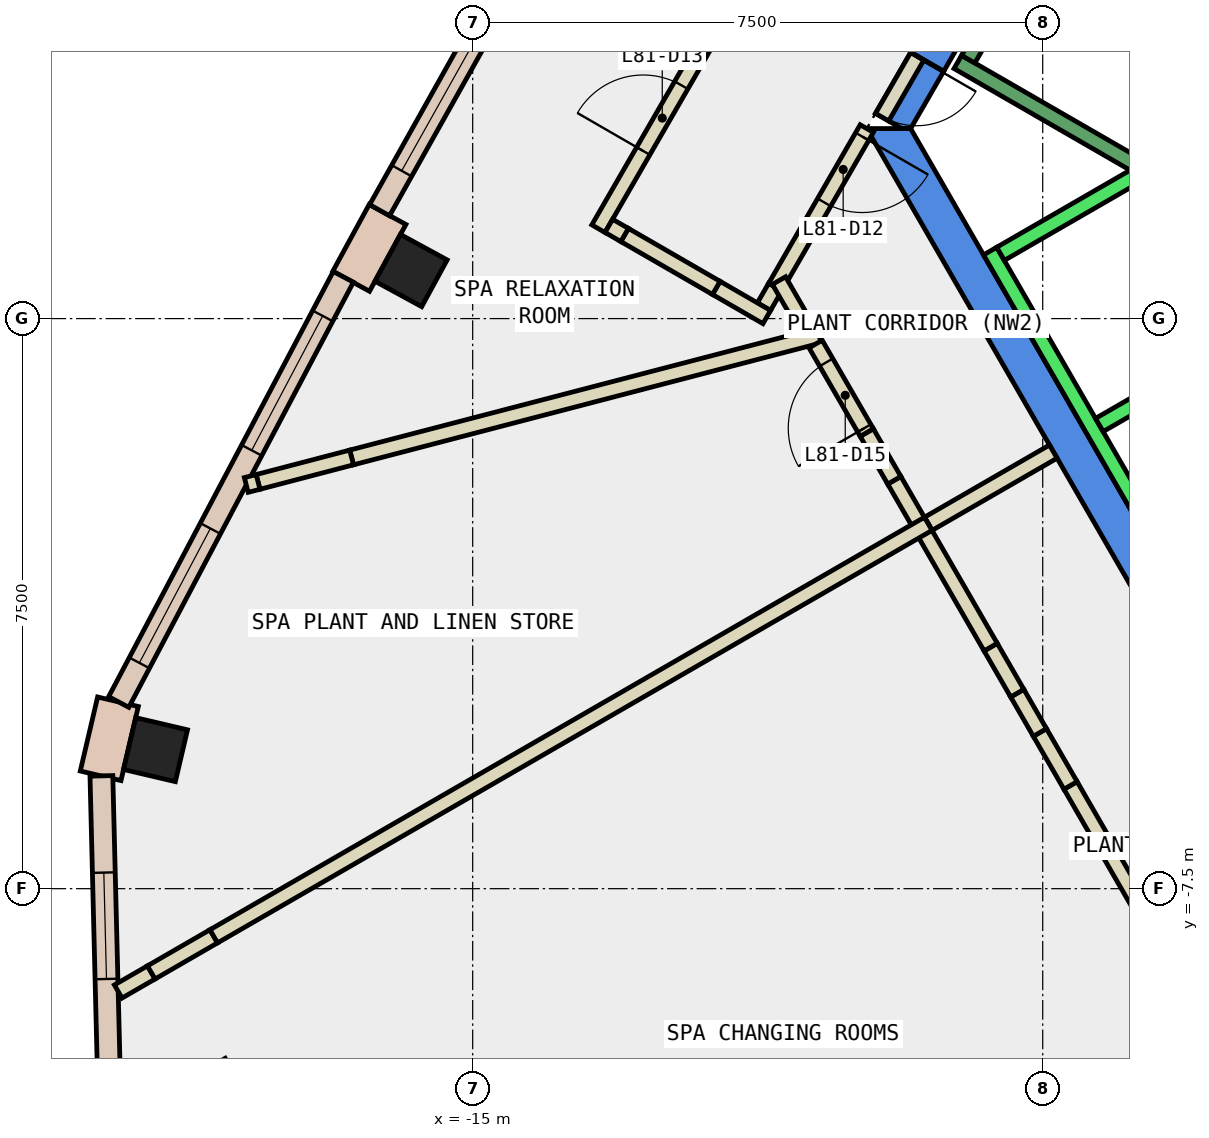
"""IFC4 building model, lengths in metres.
Left out: names, types, materials, properties, quantities, classifications, styles, units other than length and angle.
Written with IfcOpenShell. Run it as: python <this file> out.ifc"""

import sys

from ifc_helpers import new_model, si_unit, direction, frame, frame_2d, origin, origin_2d, place, context, subcontext, project, spatial, polyline, rectangle, outline, extrude, element, fill, save


model = new_model("IFC4")
c1 = context("Model", 3, precision=1e-05, world=origin(), true_north=direction((0.0, 1.0)))
c2 = subcontext(c1, "Body", "Model", "MODEL_VIEW")
j1 = project(units=[si_unit("LENGTHUNIT", "METRE"), si_unit("PLANEANGLEUNIT", "RADIAN")], contexts=[c1])
p1 = place(None, origin())
s1 = spatial("IfcSite", under=j1, at=p1, CompositionType="ELEMENT")
p2 = place(p1, origin())
s2 = spatial("IfcBuilding", under=s1, at=p2, CompositionType="ELEMENT")
p3 = place(p2, frame((0.0, 0.0, 344.9)))
s3 = spatial("IfcBuildingStorey", under=s2, at=p3, CompositionType="ELEMENT", Elevation=344.9)
for number, where, z_axis, x_axis in (
    (1, (-15.811, 0.632, -0.35), (0.0, 0.0, 1.0), (0.478, 0.878, 0.0)),
    (2, (-19.173, -5.671, -0.35), (0.0, 0.0, 1.0), (0.228, 0.974, 0.0)),
):
    element("IfcColumn", number, at=place(p3, frame(where, z_axis=z_axis, x_axis=x_axis)), inside=s3, PredefinedType="COLUMN", context=c2, shape_type="SweptSolid", body=[
        extrude(rectangle(XDim=0.7, YDim=0.7, at=origin_2d()), origin(), (0.0, 0.0, 1.0), 4.4),
    ])
p4 = place(p3, frame((-18.512, -10.688, -0.35), z_axis=(0.0, 0.0, 1.0), x_axis=(0.866025403784, 0.5, 0.0)))
e3 = element("IfcColumn", 3, at=p4, inside=s3, PredefinedType="COLUMN", context=c2, shape_type="SweptSolid", body=[
    extrude(rectangle(XDim=1.4, YDim=1.4, at=origin_2d()), origin(), (0.0, 0.0, 1.0), 4.4),
])
p5 = place(p3, frame((0.0, 0.0, -0.35)))
e4 = element("IfcWall", 4, at=p5, inside=s3, PredefinedType="SHEAR", context=c2, shape_type="SweptSolid", body=[
    extrude(outline(polyline([(-9.236, 3.502), (-8.803, 3.253), (-4.619, 10.5), (-4.907, 11.0), (-9.236, 3.502)])), origin(), (0.0, 0.0, 1.0), 4.4),
])
p6 = place(p3, frame((0.0, 0.0, 3.6)))
e5 = element("IfcWall", 5, at=p6, inside=s3, PredefinedType="SHEAR", context=c2, shape_type="SweptSolid", body=[
    extrude(outline(polyline([(-9.7, 2.7), (-9.354, 2.5), (-9.238, 2.5), (-8.803, 3.253), (-9.236, 3.502), (-9.7, 2.7)])), origin(), (0.0, 0.0, 1.0), 0.45),
])
p7 = place(p3, frame((0.0, 0.0, -0.35)))
e6 = element("IfcWall", 6, at=p7, inside=s3, PredefinedType="SHEAR", context=c2, shape_type="SweptSolid", body=[
    extrude(outline(polyline([(-9.815, 2.5), (-4.907, -6.0), (-4.619, -5.5), (-9.238, 2.5), (-9.815, 2.5)])), origin(), (0.0, 0.0, 1.0), 4.4),
])
p8 = place(p3, frame((-16.12, 1.37, 0.0), z_axis=(0.0, 0.0, 1.0), x_axis=(-0.478442030542, -0.878119139645, 0.0)))
e7 = element("IfcWall", 7, at=p8, inside=s3, PredefinedType="STANDARD", context=c2, shape_type="SweptSolid", body=[
    extrude(rectangle(XDim=1.001, YDim=0.55, at=frame_2d((0.5, 0.0))), origin(), (0.0, 0.0, 1.0), 4.05),
])
p9 = place(p3, frame((-19.667, -5.041, 0.0), z_axis=(0.0, 0.0, 1.0), x_axis=(-0.227978015861, -0.97366627973, 0.0)))
e8 = element("IfcWall", 8, at=p9, inside=s3, PredefinedType="STANDARD", context=c2, shape_type="SweptSolid", body=[
    extrude(rectangle(XDim=1.0, YDim=0.55, at=frame_2d((0.5, 0.0))), origin(), (0.0, 0.0, 1.0), 4.05),
])
p10 = place(p3, frame((-13.104, 6.99, 0.0), z_axis=(0.0, 0.0, 1.0), x_axis=(-0.489232514948, -0.872153396094, 0.0)))
e9 = element("IfcWall", 9, at=p10, inside=s3, PredefinedType="STANDARD", context=c2, shape_type="SweptSolid", body=[
    extrude(rectangle(XDim=6.38, YDim=0.3, at=frame_2d((3.19, 0.0))), origin(), (0.0, 0.0, 1.0), 4.05),
])
p11 = place(p10, frame((0.595, 0.0, 0.9)))
e10 = element("IfcOpeningElement", 10, at=p11, cuts=e9, PredefinedType="OPENING", context=c2, shape_type="SweptSolid", body=[
    extrude(rectangle(XDim=2.0, YDim=3.0, at=frame_2d((1.0, 1.5))), frame((0.0, 0.16, 0.0), z_axis=(0.0, -1.0, 0.0), x_axis=(1.0, 0.0, 0.0)), (0.0, 0.0, 1.0), 0.32),
])
p12 = place(p10, frame((3.785, 0.0, 0.9)))
e11 = element("IfcOpeningElement", 11, at=p12, cuts=e9, PredefinedType="OPENING", context=c2, shape_type="SweptSolid", body=[
    extrude(rectangle(XDim=2.0, YDim=3.0, at=frame_2d((1.0, 1.5))), frame((0.0, 0.16, 0.0), z_axis=(0.0, -1.0, 0.0), x_axis=(1.0, 0.0, 0.0)), (0.0, 0.0, 1.0), 0.32),
])
p13 = place(p3, frame((-16.702, 0.549, 0.0), z_axis=(0.0, 0.0, 1.0), x_axis=(-0.467155191513, -0.884175337274, 0.0)))
e12 = element("IfcWall", 12, at=p13, inside=s3, PredefinedType="STANDARD", context=c2, shape_type="SweptSolid", body=[
    extrude(rectangle(XDim=6.326, YDim=0.3, at=frame_2d((3.163, 0.0))), origin(), (0.0, 0.0, 1.0), 4.05),
])
p14 = place(p13, frame((0.581, 0.0, 0.9)))
e13 = element("IfcOpeningElement", 13, at=p14, cuts=e12, PredefinedType="OPENING", context=c2, shape_type="SweptSolid", body=[
    extrude(rectangle(XDim=2.0, YDim=3.0, at=frame_2d((1.0, 1.5))), frame((0.0, 0.16, 0.0), z_axis=(0.0, -1.0, 0.0), x_axis=(1.0, 0.0, 0.0)), (0.0, 0.0, 1.0), 0.32),
])
p15 = place(p13, frame((3.744, 0.0, 0.9)))
e14 = element("IfcOpeningElement", 14, at=p15, cuts=e12, PredefinedType="OPENING", context=c2, shape_type="SweptSolid", body=[
    extrude(rectangle(XDim=2.0, YDim=3.0, at=frame_2d((1.0, 1.5))), frame((0.0, 0.16, 0.0), z_axis=(0.0, -1.0, 0.0), x_axis=(1.0, 0.0, 0.0)), (0.0, 0.0, 1.0), 0.32),
])
p16 = place(p3, frame((-19.885, -6.016, 0.0), z_axis=(0.0, 0.0, 1.0), x_axis=(0.025006167975, -0.99968729689, 0.0)))
e15 = element("IfcWall", 15, at=p16, inside=s3, PredefinedType="STANDARD", context=c2, shape_type="SweptSolid", body=[
    extrude(rectangle(XDim=4.364, YDim=0.3, at=frame_2d((2.182, 0.0))), origin(), (0.0, 0.0, 1.0), 4.05),
])
p17 = place(p16, frame((1.273, 0.0, 0.9)))
e16 = element("IfcOpeningElement", 16, at=p17, cuts=e15, PredefinedType="OPENING", context=c2, shape_type="SweptSolid", body=[
    extrude(rectangle(XDim=1.4, YDim=3.0, at=frame_2d((0.7, 1.5))), frame((0.0, 0.16, 0.0), z_axis=(0.0, -1.0, 0.0), x_axis=(1.0, 0.0, 0.0)), (0.0, 0.0, 1.0), 0.32),
])
p18 = place(p3, frame((-6.112, -7.913, 0.0), z_axis=(0.0, 0.0, 1.0), x_axis=(-0.499812034598, 0.866133898465, 0.0)))
e17 = element("IfcWall", 17, at=p18, inside=s3, PredefinedType="PARTITIONING", context=c2, shape_type="SweptSolid", body=[
    extrude(rectangle(XDim=2.045, YDim=0.2, at=frame_2d((1.022, 0.0))), origin(), (0.0, 0.0, 1.0), 4.05),
])
p19 = place(p3, frame((-9.006, -2.7, 0.0), z_axis=(0.0, 0.0, 1.0), x_axis=(0.865980106173, 0.500078449558, 0.0)))
e18 = element("IfcWall", 18, at=p19, inside=s3, PredefinedType="PARTITIONING", context=c2, shape_type="SweptSolid", body=[
    extrude(rectangle(XDim=1.9, YDim=0.2, at=frame_2d((0.95, 0.0))), origin(), (0.0, 0.0, 1.0), 4.05),
])
p20 = place(p3, frame((-19.664, -8.853, 0.0), z_axis=(0.0, 0.0, 1.0), x_axis=(0.866201770413, 0.499694399542, 0.0)))
e19 = element("IfcWall", 19, at=p20, inside=s3, PredefinedType="PARTITIONING", context=c2, shape_type="SweptSolid", body=[
    extrude(rectangle(XDim=0.502, YDim=0.2, at=frame_2d((0.251, 0.0))), origin(), (0.0, 0.0, 1.0), 4.05),
])
p21 = place(p3, frame((-9.815, 2.5, 0.0), z_axis=(0.0, 0.0, 1.0), x_axis=(-0.500061536317, -0.86598987286, 0.0)))
e20 = element("IfcWall", 20, at=p21, inside=s3, PredefinedType="PARTITIONING", context=c2, shape_type="SweptSolid", body=[
    extrude(rectangle(XDim=2.41, YDim=0.2, at=frame_2d((1.205, 0.0))), origin(), (0.0, 0.0, 1.0), 4.05),
])
p22 = place(p21, frame((0.121, 0.0, 0.0)))
e21 = element("IfcOpeningElement", 21, at=p22, cuts=e20, PredefinedType="OPENING", context=c2, shape_type="SweptSolid", body=[
    extrude(rectangle(XDim=1.0, YDim=2.1, at=frame_2d((0.5, 1.05))), frame((0.0, 0.11, 0.0), z_axis=(0.0, -1.0, 0.0), x_axis=(1.0, 0.0, 0.0)), (0.0, 0.0, 1.0), 0.22),
])
p23 = place(p3, frame((-11.02, 0.413, 0.0), z_axis=(0.0, 0.0, 1.0), x_axis=(-0.500222587251, -0.865896854829, 0.0)))
e22 = element("IfcWall", 22, at=p23, inside=s3, PredefinedType="PARTITIONING", context=c2, shape_type="SweptSolid", body=[
    extrude(rectangle(XDim=0.296, YDim=0.2, at=frame_2d((0.148, 0.0))), origin(), (0.0, 0.0, 1.0), 4.05),
])
p24 = place(p3, frame((-11.131, 0.02, 0.0), z_axis=(0.0, 0.0, 1.0), x_axis=(-0.865586075524, 0.500760168003, 0.0)))
e23 = element("IfcWall", 23, at=p24, inside=s3, PredefinedType="PARTITIONING", context=c2, shape_type="SweptSolid", body=[
    extrude(rectangle(XDim=0.767, YDim=0.2, at=frame_2d((0.383, 0.0))), origin(), (0.0, 0.0, 1.0), 4.05),
])
p25 = place(p3, frame((-13.346, 1.183, 0.0), z_axis=(0.0, 0.0, 1.0), x_axis=(0.500073414727, 0.865983013623, 0.0)))
e24 = element("IfcWall", 24, at=p25, inside=s3, PredefinedType="PARTITIONING", context=c2, shape_type="SweptSolid", body=[
    extrude(rectangle(XDim=5.359, YDim=0.2, at=frame_2d((2.68, 0.0))), origin(), (0.0, 0.0, 1.0), 4.05),
])
p26 = place(p25, frame((1.18, 0.0, 0.0)))
e25 = element("IfcOpeningElement", 25, at=p26, cuts=e24, PredefinedType="OPENING", context=c2, shape_type="SweptSolid", body=[
    extrude(rectangle(XDim=1.0, YDim=2.1, at=frame_2d((0.5, 1.05))), frame((0.0, 0.11, 0.0), z_axis=(0.0, -1.0, 0.0), x_axis=(1.0, 0.0, 0.0)), (0.0, 0.0, 1.0), 0.22),
])
p27 = place(p3, frame((-10.588, -0.161, 0.0), z_axis=(0.0, 0.0, 1.0), x_axis=(-0.500506694522, 0.865732665861, 0.0)))
e26 = element("IfcWall", 26, at=p27, inside=s3, PredefinedType="PARTITIONING", context=c2, shape_type="SweptSolid", body=[
    extrude(rectangle(XDim=0.763, YDim=0.2, at=frame_2d((0.382, 0.0))), origin(), (0.0, 0.0, 1.0), 4.05),
])
p28 = place(p3, frame((-9.093, -2.75, 0.0), z_axis=(0.0, 0.0, 1.0), x_axis=(-0.500153222552, 0.865936922628, 0.0)))
e27 = element("IfcWall", 27, at=p28, inside=s3, PredefinedType="PARTITIONING", context=c2, shape_type="SweptSolid", body=[
    extrude(rectangle(XDim=0.719, YDim=0.2, at=frame_2d((0.36, 0.0))), origin(), (0.0, 0.0, 1.0), 4.05),
])
p29 = place(p3, frame((-10.441, -0.223, 0.0), z_axis=(0.0, 0.0, 1.0), x_axis=(-0.967651517998, -0.252290585866, 0.0)))
e28 = element("IfcWall", 28, at=p29, inside=s3, PredefinedType="PARTITIONING", context=c2, shape_type="SweptSolid", body=[
    extrude(rectangle(XDim=6.358, YDim=0.2, at=frame_2d((3.179, 0.0))), origin(), (0.0, 0.0, 1.0), 4.05),
])
p30 = place(p3, frame((-9.15, 3.452, 0.0), z_axis=(0.0, 0.0, 1.0), x_axis=(-0.500079945886, -0.865979242085, 0.0)))
e29 = element("IfcWall", 29, at=p30, inside=s3, PredefinedType="PARTITIONING", context=c2, shape_type="SweptSolid", body=[
    extrude(rectangle(XDim=0.926, YDim=0.2, at=frame_2d((0.463, 0.0))), origin(), (0.0, 0.0, 1.0), 2.4),
])
p31 = place(p30, frame((0.017, 0.0, 0.0)))
e30 = element("IfcOpeningElement", 30, at=p31, cuts=e29, PredefinedType="OPENING", context=c2, shape_type="SweptSolid", body=[
    extrude(rectangle(XDim=0.9, YDim=2.1, at=frame_2d((0.45, 1.05))), frame((0.0, 0.11, 0.0), z_axis=(0.0, -1.0, 0.0), x_axis=(1.0, 0.0, 0.0)), (0.0, 0.0, 1.0), 0.22),
])
p32 = place(p3, frame((-7.134, -6.142, 0.0), z_axis=(0.0, 0.0, 1.0), x_axis=(-0.500605921862, 0.865675291894, 0.0)))
e31 = element("IfcWall", 31, at=p32, inside=s3, PredefinedType="PARTITIONING", context=c2, shape_type="SweptSolid", body=[
    extrude(rectangle(XDim=0.805, YDim=0.2, at=frame_2d((0.403, 0.0))), origin(), (0.0, 0.0, 1.0), 1.95),
])
p33 = place(p3, frame((-7.537, -5.445, 0.0), z_axis=(0.0, 0.0, 1.0), x_axis=(-0.499132035552, 0.866525943689, 0.0)))
e32 = element("IfcWall", 32, at=p33, inside=s3, PredefinedType="PARTITIONING", context=c2, shape_type="SweptSolid", body=[
    extrude(rectangle(XDim=0.597, YDim=0.2, at=frame_2d((0.298, 0.0))), origin(), (0.0, 0.0, 1.0), 4.05),
])
p34 = place(p3, frame((-7.835, -4.928, 0.0), z_axis=(0.0, 0.0, 1.0), x_axis=(-0.500265973451, 0.865871789474, 0.0)))
e33 = element("IfcWall", 33, at=p34, inside=s3, PredefinedType="PARTITIONING", context=c2, shape_type="SweptSolid", body=[
    extrude(rectangle(XDim=0.7, YDim=0.2, at=frame_2d((0.35, 0.0))), origin(), (0.0, 0.0, 1.0), 1.95),
])
p35 = place(p3, frame((-8.185, -4.322, 0.0), z_axis=(0.0, 0.0, 1.0), x_axis=(-0.500145398563, 0.865941441609, 0.0)))
e34 = element("IfcWall", 34, at=p35, inside=s3, PredefinedType="PARTITIONING", context=c2, shape_type="SweptSolid", body=[
    extrude(rectangle(XDim=1.815, YDim=0.2, at=frame_2d((0.908, 0.0))), origin(), (0.0, 0.0, 1.0), 4.05),
])
p36 = place(p3, frame((-19.229, -8.602, 0.0), z_axis=(0.0, 0.0, 1.0), x_axis=(0.865795757611, 0.500397548058, 0.0)))
e35 = element("IfcWall", 35, at=p36, inside=s3, PredefinedType="PARTITIONING", context=c2, shape_type="SweptSolid", body=[
    extrude(rectangle(XDim=0.949, YDim=0.2, at=frame_2d((0.475, 0.0))), origin(), (0.0, 0.0, 1.0), 1.95),
])
p37 = place(p3, frame((-18.407, -8.127, 0.0), z_axis=(0.0, 0.0, 1.0), x_axis=(0.866049258168, 0.49995868072, 0.0)))
e36 = element("IfcWall", 36, at=p37, inside=s3, PredefinedType="PARTITIONING", context=c2, shape_type="SweptSolid", body=[
    extrude(rectangle(XDim=10.855, YDim=0.2, at=frame_2d((5.427, 0.0))), origin(), (0.0, 0.0, 1.0), 4.05),
])
p38 = place(p3, frame((-11.795, 0.404, 0.0), z_axis=(0.0, 0.0, 1.0), x_axis=(-0.866109685849, 0.49985399076, 0.0)))
e37 = element("IfcWall", 37, at=p38, inside=s3, PredefinedType="PARTITIONING", context=c2, shape_type="SweptSolid", body=[
    extrude(rectangle(XDim=1.393, YDim=0.2, at=frame_2d((0.696, 0.0))), origin(), (0.0, 0.0, 1.0), 1.95),
])
p39 = place(p3, frame((-13.001, 1.1, 0.0), z_axis=(0.0, 0.0, 1.0), x_axis=(-0.866422508423, 0.499311562953, 0.0)))
e38 = element("IfcWall", 38, at=p39, inside=s3, PredefinedType="PARTITIONING", context=c2, shape_type="SweptSolid", body=[
    extrude(rectangle(XDim=0.24, YDim=0.2, at=frame_2d((0.12, 0.0))), origin(), (0.0, 0.0, 1.0), 4.05),
])
p40 = place(p3, frame((-9.453, -2.127, 0.0), z_axis=(0.0, 0.0, 1.0), x_axis=(-0.499508606083, 0.866308924373, 0.0)))
e39 = element("IfcWall", 39, at=p40, inside=s3, PredefinedType="PARTITIONING", context=c2, shape_type="SweptSolid", body=[
    extrude(rectangle(XDim=0.725, YDim=0.2, at=frame_2d((0.362, 0.0))), origin(), (0.0, 0.0, 1.0), 1.95),
])
p41 = place(p3, frame((-9.815, -1.499, 0.0), z_axis=(0.0, 0.0, 1.0), x_axis=(-0.50057098838, 0.865695492418, 0.0)))
e40 = element("IfcWall", 40, at=p41, inside=s3, PredefinedType="PARTITIONING", context=c2, shape_type="SweptSolid", body=[
    extrude(rectangle(XDim=1.345, YDim=0.2, at=frame_2d((0.672, 0.0))), origin(), (0.0, 0.0, 1.0), 4.05),
])
p42 = place(p41, frame((0.066, 0.0, 0.0)))
e41 = element("IfcOpeningElement", 41, at=p42, cuts=e40, PredefinedType="OPENING", context=c2, shape_type="SweptSolid", body=[
    extrude(rectangle(XDim=1.0, YDim=2.1, at=frame_2d((0.5, 1.05))), frame((0.0, 0.11, 0.0), z_axis=(0.0, -1.0, 0.0), x_axis=(1.0, 0.0, 0.0)), (0.0, 0.0, 1.0), 0.22),
])
p43 = place(p3, frame((-16.593, -1.827, 0.0), z_axis=(0.0, 0.0, 1.0), x_axis=(-0.96744384591, -0.253085766116, 0.0)))
e42 = element("IfcWall", 42, at=p43, inside=s3, PredefinedType="PARTITIONING", context=c2, shape_type="SweptSolid", body=[
    extrude(rectangle(XDim=1.272, YDim=0.2, at=frame_2d((0.636, 0.0))), origin(), (0.0, 0.0, 1.0), 1.95),
])
p44 = place(p3, frame((-17.824, -2.149, 0.0), z_axis=(0.0, 0.0, 1.0), x_axis=(-0.968229703527, -0.250062474612, 0.0)))
e43 = element("IfcWall", 43, at=p44, inside=s3, PredefinedType="PARTITIONING", context=c2, shape_type="SweptSolid", body=[
    extrude(rectangle(XDim=0.16, YDim=0.2, at=frame_2d((0.08, 0.0))), origin(), (0.0, 0.0, 1.0), 4.05),
])
p45 = place(p3, frame((-8.192, 0.888, 0.0), z_axis=(0.0, 0.0, 1.0), x_axis=(0.500034260056, -0.866005622828, 0.0)))
e44 = element("IfcWall", 44, at=p45, inside=s3, PredefinedType="STANDARD", context=c2, shape_type="SweptSolid", body=[
    extrude(rectangle(XDim=5.399, YDim=0.2, at=frame_2d((2.7, 0.0))), origin(), (0.0, 0.0, 1.0), 4.05),
])
for number, where, z_axis, x_axis in (
    (45, (-5.977, 2.052, 0.0), (0.0, 0.0, 1.0), (-0.866, -0.5, 0.0)),
    (46, (-4.677, -0.2, 0.0), (0.0, 0.0, 1.0), (-0.866, -0.5, 0.0)),
):
    element("IfcWall", number, at=place(p3, frame(where, z_axis=z_axis, x_axis=x_axis)), inside=s3, PredefinedType="STANDARD", context=c2, shape_type="SweptSolid", body=[
        extrude(rectangle(XDim=2.399, YDim=0.2, at=frame_2d((1.2, 0.0))), origin(), (0.0, 0.0, 1.0), 4.05),
    ])
p46 = place(p3, frame((-6.25, 2.01, 0.0), z_axis=(0.0, 0.0, 1.0), x_axis=(-0.86611865017, 0.499838457731, 0.0)))
e47 = element("IfcWall", 47, at=p46, inside=s3, PredefinedType="STANDARD", context=c2, shape_type="SweptSolid", body=[
    extrude(rectangle(XDim=2.733, YDim=0.2, at=frame_2d((1.366, 0.0))), origin(), (0.0, 0.0, 1.0), 4.05),
])
p47 = place(p3, frame((-5.03, 9.388, 0.0), z_axis=(0.0, 0.0, 1.0), x_axis=(-0.499978703459, -0.866037698999, 0.0)))
e48 = element("IfcWall", 48, at=p47, inside=s3, PredefinedType="STANDARD", context=c2, shape_type="SweptSolid", body=[
    extrude(rectangle(XDim=6.9, YDim=0.2, at=frame_2d((3.45, 0.0))), origin(), (0.0, 0.0, 1.0), 4.05),
])
p48 = place(p12, origin())
e49 = element("IfcWindow", 49, at=p48, inside=s3, PartitioningType="SINGLE_PANEL", PredefinedType="WINDOW", context=c2, shape_type="SweptSolid", body=[
    extrude(rectangle(XDim=2.0, YDim=3.0, at=frame_2d((1.0, 1.5))), frame((0.0, 0.03, 0.0), z_axis=(0.0, -1.0, 0.0), x_axis=(1.0, 0.0, 0.0)), (0.0, 0.0, 1.0), 0.06),
])
fill(e11, e49)
p49 = place(p14, origin())
e50 = element("IfcWindow", 50, at=p49, inside=s3, PartitioningType="SINGLE_PANEL", PredefinedType="WINDOW", context=c2, shape_type="SweptSolid", body=[
    extrude(rectangle(XDim=2.0, YDim=3.0, at=frame_2d((1.0, 1.5))), frame((0.0, 0.03, 0.0), z_axis=(0.0, -1.0, 0.0), x_axis=(1.0, 0.0, 0.0)), (0.0, 0.0, 1.0), 0.06),
])
fill(e13, e50)
p50 = place(p15, origin())
e51 = element("IfcWindow", 51, at=p50, inside=s3, PartitioningType="SINGLE_PANEL", PredefinedType="WINDOW", context=c2, shape_type="SweptSolid", body=[
    extrude(rectangle(XDim=2.0, YDim=3.0, at=frame_2d((1.0, 1.5))), frame((0.0, 0.03, 0.0), z_axis=(0.0, -1.0, 0.0), x_axis=(1.0, 0.0, 0.0)), (0.0, 0.0, 1.0), 0.06),
])
fill(e14, e51)
p51 = place(p17, origin())
e52 = element("IfcWindow", 52, at=p51, inside=s3, PartitioningType="SINGLE_PANEL", PredefinedType="WINDOW", context=c2, shape_type="SweptSolid", body=[
    extrude(rectangle(XDim=1.4, YDim=3.0, at=frame_2d((0.7, 1.5))), frame((0.0, 0.03, 0.0), z_axis=(0.0, -1.0, 0.0), x_axis=(1.0, 0.0, 0.0)), (0.0, 0.0, 1.0), 0.06),
])
fill(e16, e52)
p52 = place(p22, origin())
e53 = element("IfcDoor", 53, at=p52, inside=s3, OperationType="SINGLE_SWING_RIGHT", PredefinedType="DOOR", context=c2, shape_type="SweptSolid", body=[
    extrude(rectangle(XDim=1.0, YDim=2.1, at=frame_2d((0.5, 1.05))), frame((0.0, 0.025, 0.0), z_axis=(0.0, -1.0, 0.0), x_axis=(1.0, 0.0, 0.0)), (0.0, 0.0, 1.0), 0.05),
])
fill(e21, e53)
p53 = place(p26, origin())
e54 = element("IfcDoor", 54, at=p53, inside=s3, OperationType="SINGLE_SWING_LEFT", PredefinedType="DOOR", context=c2, shape_type="SweptSolid", body=[
    extrude(rectangle(XDim=1.0, YDim=2.1, at=frame_2d((0.5, 1.05))), frame((0.0, 0.025, 0.0), z_axis=(0.0, -1.0, 0.0), x_axis=(1.0, 0.0, 0.0)), (0.0, 0.0, 1.0), 0.05),
])
fill(e25, e54)
p54 = place(p42, origin())
e55 = element("IfcDoor", 55, at=p54, inside=s3, OperationType="SINGLE_SWING_LEFT", PredefinedType="DOOR", context=c2, shape_type="SweptSolid", body=[
    extrude(rectangle(XDim=1.0, YDim=2.1, at=frame_2d((0.5, 1.05))), frame((0.0, 0.025, 0.0), z_axis=(0.0, -1.0, 0.0), x_axis=(1.0, 0.0, 0.0)), (0.0, 0.0, 1.0), 0.05),
])
fill(e41, e55)
p55 = place(p31, origin())
e56 = element("IfcDoor", 56, at=p55, inside=s3, OperationType="SINGLE_SWING_LEFT", PredefinedType="DOOR", context=c2, shape_type="SweptSolid", body=[
    extrude(rectangle(XDim=0.9, YDim=2.1, at=frame_2d((0.45, 1.05))), frame((0.0, 0.025, 0.0), z_axis=(0.0, -1.0, 0.0), x_axis=(1.0, 0.0, 0.0)), (0.0, 0.0, 1.0), 0.05),
])
fill(e30, e56)
save(model, sys.argv[1])
